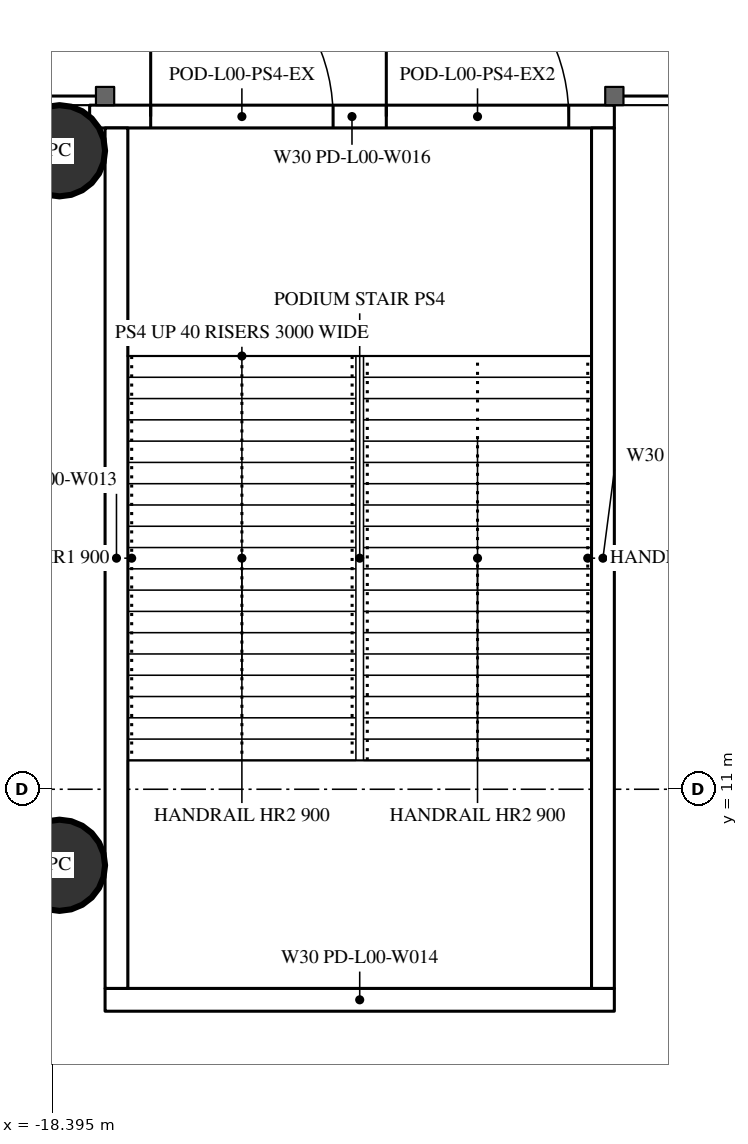
"""IFC4 building model, lengths in metres.
Left out: names, types, materials, properties, quantities, classifications, styles, units other than length and angle.
Written with IfcOpenShell. Run it as: python <this file> out.ifc"""

import sys

from ifc_helpers import new_model, si_unit, direction, frame, frame_2d, origin, origin_2d, place, context, subcontext, project, spatial, rectangle, circle, extrude, element, fill, save


model = new_model("IFC4")
c1 = context("Model", 3, precision=1e-05, world=origin(), true_north=direction((0.0, 1.0)))
c2 = subcontext(c1, "Body", "Model", "MODEL_VIEW")
j1 = project(units=[si_unit("LENGTHUNIT", "METRE"), si_unit("PLANEANGLEUNIT", "RADIAN")], contexts=[c1])
p1 = place(None, origin())
s1 = spatial("IfcSite", under=j1, at=p1, CompositionType="ELEMENT")
p2 = place(p1, origin())
s2 = spatial("IfcBuilding", under=s1, at=p2, CompositionType="ELEMENT")
p3 = place(p2, origin())
s3 = spatial("IfcBuildingStorey", under=s2, at=p3, CompositionType="ELEMENT", Elevation=0.0)
for number, where, z_axis, x_axis in (
    (1, (-18.3, 10.0, 0.0), (0.0, 0.0, 1.0), (1.0, 0.0, 0.0)),
    (2, (-18.3, 19.4, 0.0), (0.0, 0.0, 1.0), (1.0, 0.0, 0.0)),
):
    element("IfcColumn", number, at=place(p3, frame(where, z_axis=z_axis, x_axis=x_axis)), inside=s3, PredefinedType="COLUMN", context=c2, shape_type="SweptSolid", body=[
        extrude(circle(Radius=0.6, at=origin_2d()), origin(), (0.0, 0.0, 1.0), 7.2),
    ])
p4 = place(p3, frame((-17.903, 19.85, 0.0), z_axis=(0.0, 0.0, 1.0), x_axis=(1.0, 0.0, 0.0)))
e3 = element("IfcWall", 3, at=p4, inside=s3, PredefinedType="SOLIDWALL", context=c2, shape_type="SweptSolid", body=[
    extrude(rectangle(XDim=6.903, YDim=0.3, at=frame_2d((3.452, 0.0))), origin(), (0.0, 0.0, 1.0), 5.95),
])
p5 = place(p4, frame((0.803, 0.0, 0.0)))
e4 = element("IfcOpeningElement", 4, at=p5, cuts=e3, PredefinedType="OPENING", context=c2, shape_type="SweptSolid", body=[
    extrude(rectangle(XDim=2.4, YDim=2.2, at=frame_2d((1.2, 1.1))), frame((0.0, 0.16, 0.0), z_axis=(0.0, -1.0, 0.0), x_axis=(1.0, 0.0, 0.0)), (0.0, 0.0, 1.0), 0.32),
])
p6 = place(p4, frame((3.903, 0.0, 0.0)))
e5 = element("IfcOpeningElement", 5, at=p6, cuts=e3, PredefinedType="OPENING", context=c2, shape_type="SweptSolid", body=[
    extrude(rectangle(XDim=2.4, YDim=2.2, at=frame_2d((1.2, 1.1))), frame((0.0, 0.16, 0.0), z_axis=(0.0, -1.0, 0.0), x_axis=(1.0, 0.0, 0.0)), (0.0, 0.0, 1.0), 0.32),
])
p7 = place(p3, frame((-17.7, 8.23, 0.0), z_axis=(0.0, 0.0, 1.0), x_axis=(1.0, 0.0, 0.0)))
e6 = element("IfcWall", 6, at=p7, inside=s3, PredefinedType="SOLIDWALL", context=c2, shape_type="SweptSolid", body=[
    extrude(rectangle(XDim=6.7, YDim=0.3, at=frame_2d((3.35, 0.0))), origin(), (0.0, 0.0, 1.0), 6.85),
])
for number, where, z_axis, x_axis in (
    (7, (-11.15, 8.38, 0.0), (0.0, 0.0, 1.0), (0.0, 1.0, 0.0)),
    (8, (-17.55, 8.38, 0.0), (0.0, 0.0, 1.0), (0.0, 1.0, 0.0)),
):
    element("IfcWall", number, at=place(p3, frame(where, z_axis=z_axis, x_axis=x_axis)), inside=s3, PredefinedType="SOLIDWALL", context=c2, shape_type="SweptSolid", body=[
        extrude(rectangle(XDim=11.32, YDim=0.3, at=frame_2d((5.66, 0.0))), origin(), (0.0, 0.0, 1.0), 6.85),
    ])
p8 = place(p5, origin())
e9 = element("IfcDoor", 9, at=p8, inside=s3, OperationType="DOUBLE_DOOR_SINGLE_SWING", PredefinedType="DOOR", context=c2, shape_type="SweptSolid", body=[
    extrude(rectangle(XDim=2.4, YDim=2.2, at=frame_2d((1.2, 1.1))), frame((0.0, 0.025, 0.0), z_axis=(0.0, -1.0, 0.0), x_axis=(1.0, 0.0, 0.0)), (0.0, 0.0, 1.0), 0.05),
])
fill(e4, e9)
p9 = place(p6, origin())
e10 = element("IfcDoor", 10, at=p9, inside=s3, OperationType="DOUBLE_DOOR_SINGLE_SWING", PredefinedType="DOOR", context=c2, shape_type="SweptSolid", body=[
    extrude(rectangle(XDim=2.4, YDim=2.2, at=frame_2d((1.2, 1.1))), frame((0.0, 0.025, 0.0), z_axis=(0.0, -1.0, 0.0), x_axis=(1.0, 0.0, 0.0)), (0.0, 0.0, 1.0), 0.05),
])
fill(e5, e10)
save(model, sys.argv[1])
